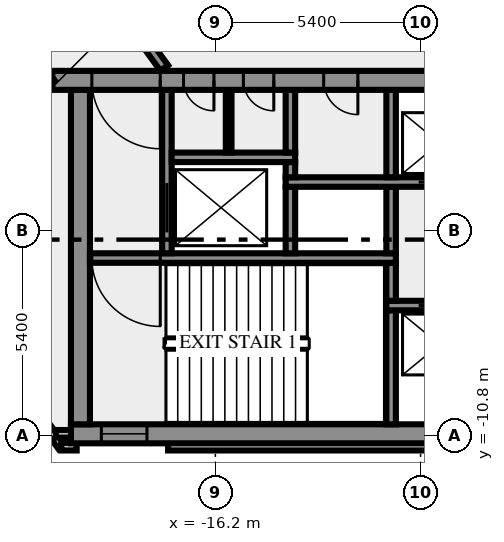
"""IFC4 building model, lengths in metres.
Left out: names, types, materials, properties, quantities, classifications, styles, units other than length and angle.
Written with IfcOpenShell. Run it as: python <this file> out.ifc"""

import sys

from ifc_helpers import new_model, si_unit, direction, frame, frame_2d, origin, place, context, subcontext, project, spatial, rectangle, extrude, element, fill, save


model = new_model("IFC4")
c1 = context("Model", 3, precision=1e-05, world=origin(), true_north=direction((0.0, 1.0)))
c2 = subcontext(c1, "Body", "Model", "MODEL_VIEW")
j1 = project(units=[si_unit("LENGTHUNIT", "METRE"), si_unit("PLANEANGLEUNIT", "RADIAN")], contexts=[c1])
p1 = place(None, origin())
s1 = spatial("IfcSite", under=j1, at=p1, CompositionType="ELEMENT")
p2 = place(p1, origin())
s2 = spatial("IfcBuilding", under=s1, at=p2, CompositionType="ELEMENT")
p3 = place(p2, frame((0.0, 0.0, 16.0)))
s3 = spatial("IfcBuildingStorey", under=s2, at=p3, CompositionType="ELEMENT", Elevation=16.0)
p4 = place(p3, frame((-21.833, -8.909, 0.0), z_axis=(0.0, 0.0, 1.0), x_axis=(0.587766567315, -0.809030569476, 0.0)))
e1 = element("IfcWall", 1, at=p4, inside=s3, PredefinedType="SOLIDWALL", context=c2, shape_type="SweptSolid", body=[
    extrude(rectangle(XDim=2.688, YDim=0.2, at=frame_2d((1.344, 0.0))), origin(), (0.0, 0.0, 1.0), 4.1),
])
p5 = place(p3, frame((-20.256, -11.088, 0.0), z_axis=(0.0, 0.0, 1.0), x_axis=(1.0, 0.0, 0.0)))
e2 = element("IfcWall", 2, at=p5, inside=s3, PredefinedType="SOLIDWALL", context=c2, shape_type="SweptSolid", body=[
    extrude(rectangle(XDim=0.406, YDim=0.2, at=frame_2d((0.203, 0.0))), origin(), (0.0, 0.0, 1.0), 4.1),
])
p6 = place(p3, frame((-17.444, -11.088, 0.0), z_axis=(0.0, 0.0, 1.0), x_axis=(1.0, 0.0, 0.0)))
e3 = element("IfcWall", 3, at=p6, inside=s3, PredefinedType="SOLIDWALL", context=c2, shape_type="SweptSolid", body=[
    extrude(rectangle(XDim=34.888, YDim=0.2, at=frame_2d((17.444, 0.0))), origin(), (0.0, 0.0, 1.0), 4.1),
])
p7 = place(p3, frame((-19.98, -10.75, 0.0), z_axis=(0.0, 0.0, 1.0), x_axis=(-1.0, 0.0, 0.0)))
e4 = element("IfcWall", 4, at=p7, inside=s3, PredefinedType="SOLIDWALL", context=c2, shape_type="SweptSolid", body=[
    extrude(rectangle(XDim=0.417, YDim=0.2, at=frame_2d((0.208, 0.0))), origin(), (0.0, 0.0, 1.0), 4.1),
])
p8 = place(p3, frame((-20.0, -10.75, 0.0), z_axis=(0.0, 0.0, 1.0), x_axis=(1.0, 0.0, 0.0)))
e5 = element("IfcWall", 5, at=p8, inside=s3, PredefinedType="SHEAR", context=c2, shape_type="SweptSolid", body=[
    extrude(rectangle(XDim=40.0, YDim=0.5, at=frame_2d((20.0, 0.0))), origin(), (0.0, 0.0, 1.0), 4.1),
])
p9 = place(p8, frame((0.8, 0.0, 1.0)))
e6 = element("IfcOpeningElement", 6, at=p9, cuts=e5, PredefinedType="OPENING", context=c2, shape_type="SweptSolid", body=[
    extrude(rectangle(XDim=1.2, YDim=1.2, at=frame_2d((0.6, 0.6))), frame((0.0, 0.26, 0.0), z_axis=(0.0, -1.0, 0.0), x_axis=(1.0, 0.0, 0.0)), (0.0, 0.0, 1.0), 0.52),
])
p10 = place(p8, frame((38.0, 0.0, 1.0)))
e7 = element("IfcOpeningElement", 7, at=p10, cuts=e5, PredefinedType="OPENING", context=c2, shape_type="SweptSolid", body=[
    extrude(rectangle(XDim=1.2, YDim=1.2, at=frame_2d((0.6, 0.6))), frame((0.0, 0.26, 0.0), z_axis=(0.0, -1.0, 0.0), x_axis=(1.0, 0.0, 0.0)), (0.0, 0.0, 1.0), 0.52),
])
p11 = place(p3, frame((-19.75, -10.5, 0.0), z_axis=(0.0, 0.0, 1.0), x_axis=(0.0, 1.0, 0.0)))
e8 = element("IfcWall", 8, at=p11, inside=s3, PredefinedType="SHEAR", context=c2, shape_type="SweptSolid", body=[
    extrude(rectangle(XDim=8.8, YDim=0.5, at=frame_2d((4.4, 0.0))), origin(), (0.0, 0.0, 1.0), 4.1),
])
p12 = place(p3, frame((-11.575, -10.5, 0.0), z_axis=(0.0, 0.0, 1.0), x_axis=(0.0, 1.0, 0.0)))
e9 = element("IfcWall", 9, at=p12, inside=s3, PredefinedType="SHEAR", context=c2, shape_type="SweptSolid", body=[
    extrude(rectangle(XDim=3.0, YDim=0.25, at=frame_2d((1.5, 0.0))), origin(), (0.0, 0.0, 1.0), 4.1),
])
p13 = place(p3, frame((11.7, -7.375, 0.0), z_axis=(0.0, 0.0, 1.0), x_axis=(-1.0, 0.0, 0.0)))
e10 = element("IfcWall", 10, at=p13, inside=s3, PredefinedType="SHEAR", context=c2, shape_type="SweptSolid", body=[
    extrude(rectangle(XDim=23.4, YDim=0.25, at=frame_2d((11.7, 0.0))), origin(), (0.0, 0.0, 1.0), 4.1),
])
p14 = place(p13, frame((21.45, 0.0, 0.0)))
e11 = element("IfcOpeningElement", 11, at=p14, cuts=e10, PredefinedType="OPENING", context=c2, shape_type="SweptSolid", body=[
    extrude(rectangle(XDim=1.1, YDim=2.1, at=frame_2d((0.55, 1.05))), frame((0.0, 0.135, 0.0), z_axis=(0.0, -1.0, 0.0), x_axis=(1.0, 0.0, 0.0)), (0.0, 0.0, 1.0), 0.27),
])
p15 = place(p13, frame((18.95, 0.0, 0.0)))
e12 = element("IfcOpeningElement", 12, at=p15, cuts=e10, PredefinedType="OPENING", context=c2, shape_type="SweptSolid", body=[
    extrude(rectangle(XDim=1.1, YDim=2.1, at=frame_2d((0.55, 1.05))), frame((0.0, 0.135, 0.0), z_axis=(0.0, -1.0, 0.0), x_axis=(1.0, 0.0, 0.0)), (0.0, 0.0, 1.0), 0.27),
])
p16 = place(p13, frame((16.45, 0.0, 0.0)))
e13 = element("IfcOpeningElement", 13, at=p16, cuts=e10, PredefinedType="OPENING", context=c2, shape_type="SweptSolid", body=[
    extrude(rectangle(XDim=1.1, YDim=2.1, at=frame_2d((0.55, 1.05))), frame((0.0, 0.135, 0.0), z_axis=(0.0, -1.0, 0.0), x_axis=(1.0, 0.0, 0.0)), (0.0, 0.0, 1.0), 0.27),
])
p17 = place(p13, frame((14.75, 0.0, 0.0)))
e14 = element("IfcOpeningElement", 14, at=p17, cuts=e10, PredefinedType="OPENING", context=c2, shape_type="SweptSolid", body=[
    extrude(rectangle(XDim=0.7, YDim=2.1, at=frame_2d((0.35, 1.05))), frame((0.0, 0.135, 0.0), z_axis=(0.0, -1.0, 0.0), x_axis=(1.0, 0.0, 0.0)), (0.0, 0.0, 1.0), 0.27),
])
p18 = place(p13, frame((13.35, 0.0, 0.0)))
e15 = element("IfcOpeningElement", 15, at=p18, cuts=e10, PredefinedType="OPENING", context=c2, shape_type="SweptSolid", body=[
    extrude(rectangle(XDim=0.9, YDim=2.1, at=frame_2d((0.45, 1.05))), frame((0.0, 0.135, 0.0), z_axis=(0.0, -1.0, 0.0), x_axis=(1.0, 0.0, 0.0)), (0.0, 0.0, 1.0), 0.27),
])
p19 = place(p13, frame((11.975, 0.0, 0.0)))
e16 = element("IfcOpeningElement", 16, at=p19, cuts=e10, PredefinedType="OPENING", context=c2, shape_type="SweptSolid", body=[
    extrude(rectangle(XDim=0.9, YDim=2.1, at=frame_2d((0.45, 1.05))), frame((0.0, 0.135, 0.0), z_axis=(0.0, -1.0, 0.0), x_axis=(1.0, 0.0, 0.0)), (0.0, 0.0, 1.0), 0.27),
])
p20 = place(p13, frame((10.5, 0.0, 0.0)))
e17 = element("IfcOpeningElement", 17, at=p20, cuts=e10, PredefinedType="OPENING", context=c2, shape_type="SweptSolid", body=[
    extrude(rectangle(XDim=0.9, YDim=2.1, at=frame_2d((0.45, 1.05))), frame((0.0, 0.135, 0.0), z_axis=(0.0, -1.0, 0.0), x_axis=(1.0, 0.0, 0.0)), (0.0, 0.0, 1.0), 0.27),
])
p21 = place(p3, frame((-11.575, -7.25, 0.0), z_axis=(0.0, 0.0, 1.0), x_axis=(0.0, 1.0, 0.0)))
e18 = element("IfcWall", 18, at=p21, inside=s3, PredefinedType="SHEAR", context=c2, shape_type="SweptSolid", body=[
    extrude(rectangle(XDim=1.0, YDim=0.25, at=frame_2d((0.5, 0.0))), origin(), (0.0, 0.0, 1.0), 4.1),
])
p22 = place(p3, frame((-11.45, -6.125, 0.0), z_axis=(0.0, 0.0, 1.0), x_axis=(-1.0, 0.0, 0.0)))
e19 = element("IfcWall", 19, at=p22, inside=s3, PredefinedType="SHEAR", context=c2, shape_type="SweptSolid", body=[
    extrude(rectangle(XDim=8.05, YDim=0.25, at=frame_2d((4.025, 0.0))), origin(), (0.0, 0.0, 1.0), 4.1),
])
p23 = place(p22, frame((6.2, 0.0, 0.0)))
e20 = element("IfcOpeningElement", 20, at=p23, cuts=e19, PredefinedType="OPENING", context=c2, shape_type="SweptSolid", body=[
    extrude(rectangle(XDim=1.8, YDim=2.1, at=frame_2d((0.9, 1.05))), frame((0.0, 0.135, 0.0), z_axis=(0.0, -1.0, 0.0), x_axis=(1.0, 0.0, 0.0)), (0.0, 0.0, 1.0), 0.27),
])
p24 = place(p3, frame((-17.475, -6.0, 0.0), z_axis=(0.0, 0.0, 1.0), x_axis=(0.0, 1.0, 0.0)))
e21 = element("IfcWall", 21, at=p24, inside=s3, PredefinedType="SHEAR", context=c2, shape_type="SweptSolid", body=[
    extrude(rectangle(XDim=4.3, YDim=0.25, at=frame_2d((2.15, 0.0))), origin(), (0.0, 0.0, 1.0), 4.1),
])
p25 = place(p24, frame((0.55, 0.0, 0.0)))
e22 = element("IfcOpeningElement", 22, at=p25, cuts=e21, PredefinedType="OPENING", context=c2, shape_type="SweptSolid", body=[
    extrude(rectangle(XDim=1.3, YDim=2.1, at=frame_2d((0.65, 1.05))), frame((0.0, 0.135, 0.0), z_axis=(0.0, -1.0, 0.0), x_axis=(1.0, 0.0, 0.0)), (0.0, 0.0, 1.0), 0.27),
])
for number, where, z_axis, x_axis in (
    (23, (-14.225, -6.0, 0.0), (0.0, 0.0, 1.0), (0.0, 1.0, 0.0)),
    (24, (-11.575, -6.0, 0.0), (0.0, 0.0, 1.0), (0.0, 1.0, 0.0)),
):
    element("IfcWall", number, at=place(p3, frame(where, z_axis=z_axis, x_axis=x_axis)), inside=s3, PredefinedType="SHEAR", context=c2, shape_type="SweptSolid", body=[
        extrude(rectangle(XDim=1.75, YDim=0.25, at=frame_2d((0.875, 0.0))), origin(), (0.0, 0.0, 1.0), 4.1),
    ])
p26 = place(p3, frame((-14.35, -4.125, 0.0), z_axis=(0.0, 0.0, 1.0), x_axis=(1.0, 0.0, 0.0)))
e25 = element("IfcWall", 25, at=p26, inside=s3, PredefinedType="SHEAR", context=c2, shape_type="SweptSolid", body=[
    extrude(rectangle(XDim=10.4, YDim=0.25, at=frame_2d((5.2, 0.0))), origin(), (0.0, 0.0, 1.0), 4.1),
])
p27 = place(p26, frame((3.5, 0.0, 0.0)))
e26 = element("IfcOpeningElement", 26, at=p27, cuts=e25, PredefinedType="OPENING", context=c2, shape_type="SweptSolid", body=[
    extrude(rectangle(XDim=1.1, YDim=2.1, at=frame_2d((0.55, 1.05))), frame((0.0, 0.135, 0.0), z_axis=(0.0, -1.0, 0.0), x_axis=(1.0, 0.0, 0.0)), (0.0, 0.0, 1.0), 0.27),
])
p28 = place(p26, frame((6.0, 0.0, 0.0)))
e27 = element("IfcOpeningElement", 27, at=p28, cuts=e25, PredefinedType="OPENING", context=c2, shape_type="SweptSolid", body=[
    extrude(rectangle(XDim=1.1, YDim=2.1, at=frame_2d((0.55, 1.05))), frame((0.0, 0.135, 0.0), z_axis=(0.0, -1.0, 0.0), x_axis=(1.0, 0.0, 0.0)), (0.0, 0.0, 1.0), 0.27),
])
p29 = place(p26, frame((8.5, 0.0, 0.0)))
e28 = element("IfcOpeningElement", 28, at=p29, cuts=e25, PredefinedType="OPENING", context=c2, shape_type="SweptSolid", body=[
    extrude(rectangle(XDim=1.1, YDim=2.1, at=frame_2d((0.55, 1.05))), frame((0.0, 0.135, 0.0), z_axis=(0.0, -1.0, 0.0), x_axis=(1.0, 0.0, 0.0)), (0.0, 0.0, 1.0), 0.27),
])
p30 = place(p3, frame((-14.225, -4.0, 0.0), z_axis=(0.0, 0.0, 1.0), x_axis=(0.0, 1.0, 0.0)))
e29 = element("IfcWall", 29, at=p30, inside=s3, PredefinedType="SHEAR", context=c2, shape_type="SweptSolid", body=[
    extrude(rectangle(XDim=0.4, YDim=0.25, at=frame_2d((0.2, 0.0))), origin(), (0.0, 0.0, 1.0), 4.1),
])
p31 = place(p3, frame((-11.575, -4.0, 0.0), z_axis=(0.0, 0.0, 1.0), x_axis=(0.0, 1.0, 0.0)))
e30 = element("IfcWall", 30, at=p31, inside=s3, PredefinedType="SHEAR", context=c2, shape_type="SweptSolid", body=[
    extrude(rectangle(XDim=2.3, YDim=0.25, at=frame_2d((1.15, 0.0))), origin(), (0.0, 0.0, 1.0), 4.1),
])
p32 = place(p3, frame((-17.35, -3.475, 0.0), z_axis=(0.0, 0.0, 1.0), x_axis=(1.0, 0.0, 0.0)))
e31 = element("IfcWall", 31, at=p32, inside=s3, PredefinedType="SHEAR", context=c2, shape_type="SweptSolid", body=[
    extrude(rectangle(XDim=3.25, YDim=0.25, at=frame_2d((1.625, 0.0))), origin(), (0.0, 0.0, 1.0), 4.1),
])
p33 = place(p3, frame((-15.85, -3.35, 0.0), z_axis=(0.0, 0.0, 1.0), x_axis=(0.0, 1.0, 0.0)))
e32 = element("IfcWall", 32, at=p33, inside=s3, PredefinedType="PARTITIONING", context=c2, shape_type="SweptSolid", body=[
    extrude(rectangle(XDim=1.65, YDim=0.15, at=frame_2d((0.825, 0.0))), origin(), (0.0, 0.0, 1.0), 4.1),
])
p34 = place(p3, frame((-14.225, -3.35, 0.0), z_axis=(0.0, 0.0, 1.0), x_axis=(0.0, 1.0, 0.0)))
e33 = element("IfcWall", 33, at=p34, inside=s3, PredefinedType="SHEAR", context=c2, shape_type="SweptSolid", body=[
    extrude(rectangle(XDim=1.65, YDim=0.25, at=frame_2d((0.825, 0.0))), origin(), (0.0, 0.0, 1.0), 4.1),
])
p35 = place(p3, frame((20.49, -1.45, 0.0), z_axis=(0.0, 0.0, 1.0), x_axis=(-1.0, 0.0, 0.0)))
e34 = element("IfcWall", 34, at=p35, inside=s3, PredefinedType="SHEAR", context=c2, shape_type="SweptSolid", body=[
    extrude(rectangle(XDim=40.98, YDim=0.5, at=frame_2d((20.49, 0.0))), origin(), (0.0, 0.0, 1.0), 4.1),
])
p36 = place(p35, frame((38.14, 0.0, 0.0)))
e35 = element("IfcOpeningElement", 35, at=p36, cuts=e34, PredefinedType="OPENING", context=c2, shape_type="SweptSolid", body=[
    extrude(rectangle(XDim=1.8, YDim=2.1, at=frame_2d((0.9, 1.05))), frame((0.0, 0.26, 0.0), z_axis=(0.0, -1.0, 0.0), x_axis=(1.0, 0.0, 0.0)), (0.0, 0.0, 1.0), 0.52),
])
p37 = place(p35, frame((36.728, 0.0, 0.0)))
e36 = element("IfcOpeningElement", 36, at=p37, cuts=e34, PredefinedType="OPENING", context=c2, shape_type="SweptSolid", body=[
    extrude(rectangle(XDim=0.8, YDim=2.1, at=frame_2d((0.4, 1.05))), frame((0.0, 0.26, 0.0), z_axis=(0.0, -1.0, 0.0), x_axis=(1.0, 0.0, 0.0)), (0.0, 0.0, 1.0), 0.52),
])
p38 = place(p35, frame((35.153, 0.0, 0.0)))
e37 = element("IfcOpeningElement", 37, at=p38, cuts=e34, PredefinedType="OPENING", context=c2, shape_type="SweptSolid", body=[
    extrude(rectangle(XDim=0.8, YDim=2.1, at=frame_2d((0.4, 1.05))), frame((0.0, 0.26, 0.0), z_axis=(0.0, -1.0, 0.0), x_axis=(1.0, 0.0, 0.0)), (0.0, 0.0, 1.0), 0.52),
])
p39 = place(p35, frame((32.94, 0.0, 0.0)))
e38 = element("IfcOpeningElement", 38, at=p39, cuts=e34, PredefinedType="OPENING", context=c2, shape_type="SweptSolid", body=[
    extrude(rectangle(XDim=0.9, YDim=2.1, at=frame_2d((0.45, 1.05))), frame((0.0, 0.26, 0.0), z_axis=(0.0, -1.0, 0.0), x_axis=(1.0, 0.0, 0.0)), (0.0, 0.0, 1.0), 0.52),
])
p40 = place(p35, frame((21.765, 0.0, 0.0)))
e39 = element("IfcOpeningElement", 39, at=p40, cuts=e34, PredefinedType="OPENING", context=c2, shape_type="SweptSolid", body=[
    extrude(rectangle(XDim=2.0, YDim=2.1, at=frame_2d((1.0, 1.05))), frame((0.0, 0.26, 0.0), z_axis=(0.0, -1.0, 0.0), x_axis=(1.0, 0.0, 0.0)), (0.0, 0.0, 1.0), 0.52),
])
p41 = place(p35, frame((7.14, 0.0, 0.0)))
e40 = element("IfcOpeningElement", 40, at=p41, cuts=e34, PredefinedType="OPENING", context=c2, shape_type="SweptSolid", body=[
    extrude(rectangle(XDim=0.9, YDim=2.1, at=frame_2d((0.45, 1.05))), frame((0.0, 0.26, 0.0), z_axis=(0.0, -1.0, 0.0), x_axis=(1.0, 0.0, 0.0)), (0.0, 0.0, 1.0), 0.52),
])
p42 = place(p35, frame((4.19, 0.0, 0.0)))
e41 = element("IfcOpeningElement", 41, at=p42, cuts=e34, PredefinedType="OPENING", context=c2, shape_type="SweptSolid", body=[
    extrude(rectangle(XDim=0.9, YDim=2.1, at=frame_2d((0.45, 1.05))), frame((0.0, 0.26, 0.0), z_axis=(0.0, -1.0, 0.0), x_axis=(1.0, 0.0, 0.0)), (0.0, 0.0, 1.0), 0.52),
])
p43 = place(p35, frame((1.04, 0.0, 0.0)))
e42 = element("IfcOpeningElement", 42, at=p43, cuts=e34, PredefinedType="OPENING", context=c2, shape_type="SweptSolid", body=[
    extrude(rectangle(XDim=1.8, YDim=2.1, at=frame_2d((0.9, 1.05))), frame((0.0, 0.26, 0.0), z_axis=(0.0, -1.0, 0.0), x_axis=(1.0, 0.0, 0.0)), (0.0, 0.0, 1.0), 0.52),
])
p44 = place(p3, frame((-20.531, -1.523, 0.0), z_axis=(0.0, 0.0, 1.0), x_axis=(-0.587784522481, 0.809017524614, 0.0)))
e43 = element("IfcWall", 43, at=p44, inside=s3, PredefinedType="SOLIDWALL", context=c2, shape_type="SweptSolid", body=[
    extrude(rectangle(XDim=49.912, YDim=0.25, at=frame_2d((24.956, 0.0))), origin(), (0.0, 0.0, 1.0), 4.1),
])
p45 = place(p44, frame((10.266, 0.0, 0.0)))
e44 = element("IfcOpeningElement", 44, at=p45, cuts=e43, PredefinedType="OPENING", context=c2, shape_type="SweptSolid", body=[
    extrude(rectangle(XDim=0.9, YDim=2.1, at=frame_2d((0.45, 1.05))), frame((0.0, 0.135, 0.0), z_axis=(0.0, -1.0, 0.0), x_axis=(1.0, 0.0, 0.0)), (0.0, 0.0, 1.0), 0.27),
])
p46 = place(p44, frame((37.193, 0.0, 0.0)))
e45 = element("IfcOpeningElement", 45, at=p46, cuts=e43, PredefinedType="OPENING", context=c2, shape_type="SweptSolid", body=[
    extrude(rectangle(XDim=1.8, YDim=2.1, at=frame_2d((0.9, 1.05))), frame((0.0, 0.135, 0.0), z_axis=(0.0, -1.0, 0.0), x_axis=(1.0, 0.0, 0.0)), (0.0, 0.0, 1.0), 0.27),
])
p47 = place(p44, frame((11.866, 0.0, 0.0)))
e46 = element("IfcOpeningElement", 46, at=p47, cuts=e43, PredefinedType="OPENING", context=c2, shape_type="SweptSolid", body=[
    extrude(rectangle(XDim=0.9, YDim=2.1, at=frame_2d((0.45, 1.05))), frame((0.0, 0.135, 0.0), z_axis=(0.0, -1.0, 0.0), x_axis=(1.0, 0.0, 0.0)), (0.0, 0.0, 1.0), 0.27),
])
p48 = place(p3, frame((-37.232, 25.972, 0.0), z_axis=(0.0, 0.0, 1.0), x_axis=(0.587786323093, -0.809016216391, 0.0)))
e47 = element("IfcWall", 47, at=p48, inside=s3, PredefinedType="SOLIDWALL", context=c2, shape_type="SweptSolid", body=[
    extrude(rectangle(XDim=33.493, YDim=0.25, at=frame_2d((16.747, 0.0))), origin(), (0.0, 0.0, 1.0), 4.1),
])
p49 = place(p48, frame((29.152, 0.0, 0.0)))
e48 = element("IfcOpeningElement", 48, at=p49, cuts=e47, PredefinedType="OPENING", context=c2, shape_type="SweptSolid", body=[
    extrude(rectangle(XDim=0.9, YDim=2.1, at=frame_2d((0.45, 1.05))), frame((0.0, 0.135, 0.0), z_axis=(0.0, -1.0, 0.0), x_axis=(1.0, 0.0, 0.0)), (0.0, 0.0, 1.0), 0.27),
])
p50 = place(p48, frame((5.113, 0.0, 0.0)))
e49 = element("IfcOpeningElement", 49, at=p50, cuts=e47, PredefinedType="OPENING", context=c2, shape_type="SweptSolid", body=[
    extrude(rectangle(XDim=1.8, YDim=2.1, at=frame_2d((0.9, 1.05))), frame((0.0, 0.135, 0.0), z_axis=(0.0, -1.0, 0.0), x_axis=(1.0, 0.0, 0.0)), (0.0, 0.0, 1.0), 0.27),
])
p51 = place(p9, origin())
e50 = element("IfcWindow", 50, at=p51, inside=s3, PartitioningType="SINGLE_PANEL", PredefinedType="WINDOW", context=c2, shape_type="SweptSolid", body=[
    extrude(rectangle(XDim=1.2, YDim=1.2, at=frame_2d((0.6, 0.6))), frame((0.0, 0.03, 0.0), z_axis=(0.0, -1.0, 0.0), x_axis=(1.0, 0.0, 0.0)), (0.0, 0.0, 1.0), 0.06),
])
fill(e6, e50)
p52 = place(p14, origin())
e51 = element("IfcDoor", 51, at=p52, inside=s3, OperationType="DOUBLE_DOOR_SLIDING", PredefinedType="DOOR", context=c2, shape_type="SweptSolid", body=[
    extrude(rectangle(XDim=1.1, YDim=2.1, at=frame_2d((0.55, 1.05))), frame((0.0, 0.025, 0.0), z_axis=(0.0, -1.0, 0.0), x_axis=(1.0, 0.0, 0.0)), (0.0, 0.0, 1.0), 0.05),
])
fill(e11, e51)
p53 = place(p23, origin())
e52 = element("IfcDoor", 52, at=p53, inside=s3, OperationType="DOUBLE_DOOR_SINGLE_SWING", PredefinedType="DOOR", context=c2, shape_type="SweptSolid", body=[
    extrude(rectangle(XDim=1.8, YDim=2.1, at=frame_2d((0.9, 1.05))), frame((0.0, 0.025, 0.0), z_axis=(0.0, -1.0, 0.0), x_axis=(1.0, 0.0, 0.0)), (0.0, 0.0, 1.0), 0.05),
])
fill(e20, e52)
p54 = place(p25, origin())
e53 = element("IfcDoor", 53, at=p54, inside=s3, OperationType="DOUBLE_DOOR_SLIDING", PredefinedType="DOOR", context=c2, shape_type="SweptSolid", body=[
    extrude(rectangle(XDim=1.3, YDim=2.1, at=frame_2d((0.65, 1.05))), frame((0.0, 0.025, 0.0), z_axis=(0.0, -1.0, 0.0), x_axis=(1.0, 0.0, 0.0)), (0.0, 0.0, 1.0), 0.05),
])
fill(e22, e53)
p55 = place(p27, origin())
e54 = element("IfcDoor", 54, at=p55, inside=s3, OperationType="DOUBLE_DOOR_SLIDING", PredefinedType="DOOR", context=c2, shape_type="SweptSolid", body=[
    extrude(rectangle(XDim=1.1, YDim=2.1, at=frame_2d((0.55, 1.05))), frame((0.0, 0.025, 0.0), z_axis=(0.0, -1.0, 0.0), x_axis=(1.0, 0.0, 0.0)), (0.0, 0.0, 1.0), 0.05),
])
fill(e26, e54)
p56 = place(p36, origin())
e55 = element("IfcDoor", 55, at=p56, inside=s3, OperationType="DOUBLE_DOOR_SINGLE_SWING", PredefinedType="DOOR", context=c2, shape_type="SweptSolid", body=[
    extrude(rectangle(XDim=1.8, YDim=2.1, at=frame_2d((0.9, 1.05))), frame((0.0, 0.025, 0.0), z_axis=(0.0, -1.0, 0.0), x_axis=(1.0, 0.0, 0.0)), (0.0, 0.0, 1.0), 0.05),
])
fill(e35, e55)
p57 = place(p37, origin())
e56 = element("IfcDoor", 56, at=p57, inside=s3, OperationType="SINGLE_SWING_RIGHT", PredefinedType="DOOR", context=c2, shape_type="SweptSolid", body=[
    extrude(rectangle(XDim=0.8, YDim=2.1, at=frame_2d((0.4, 1.05))), frame((0.0, 0.025, 0.0), z_axis=(0.0, -1.0, 0.0), x_axis=(1.0, 0.0, 0.0)), (0.0, 0.0, 1.0), 0.05),
])
fill(e36, e56)
p58 = place(p38, origin())
e57 = element("IfcDoor", 57, at=p58, inside=s3, OperationType="SINGLE_SWING_RIGHT", PredefinedType="DOOR", context=c2, shape_type="SweptSolid", body=[
    extrude(rectangle(XDim=0.8, YDim=2.1, at=frame_2d((0.4, 1.05))), frame((0.0, 0.025, 0.0), z_axis=(0.0, -1.0, 0.0), x_axis=(1.0, 0.0, 0.0)), (0.0, 0.0, 1.0), 0.05),
])
fill(e37, e57)
p59 = place(p39, origin())
e58 = element("IfcDoor", 58, at=p59, inside=s3, OperationType="SINGLE_SWING_RIGHT", PredefinedType="DOOR", context=c2, shape_type="SweptSolid", body=[
    extrude(rectangle(XDim=0.9, YDim=2.1, at=frame_2d((0.45, 1.05))), frame((0.0, 0.025, 0.0), z_axis=(0.0, -1.0, 0.0), x_axis=(1.0, 0.0, 0.0)), (0.0, 0.0, 1.0), 0.05),
])
fill(e38, e58)
save(model, sys.argv[1])
